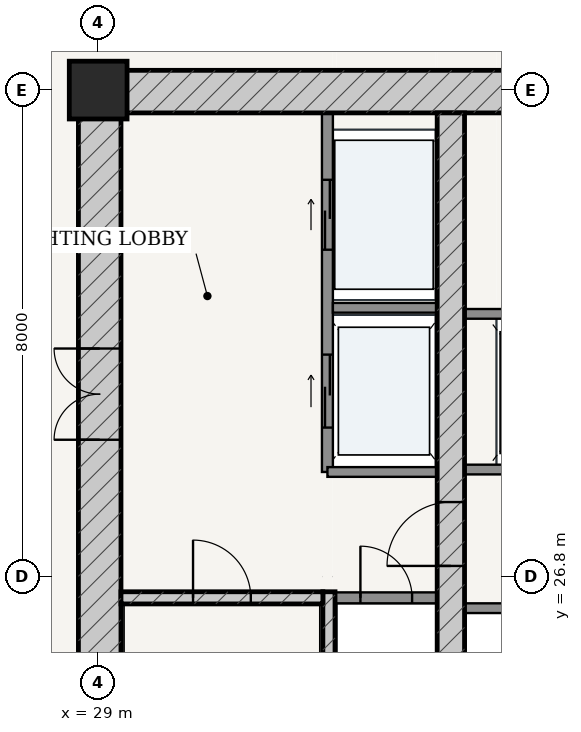
"""IFC4 building model, lengths in metres.
Left out: names, types, materials, properties, quantities, classifications, styles, units other than length and angle.
Written with IfcOpenShell. Run it as: python <this file> out.ifc"""

import sys

from ifc_helpers import new_model, si_unit, direction, frame, frame_2d, origin, origin_2d, place, context, subcontext, project, spatial, rectangle, extrude, source, transform, mapped, element, fill, save


model = new_model("IFC4")
c1 = context("Model", 3, precision=1e-05, world=origin(), true_north=direction((-0.2419218956, 0.970295726276)))
c2 = subcontext(c1, "Body", "Model", "MODEL_VIEW")
j1 = project(units=[si_unit("LENGTHUNIT", "METRE"), si_unit("PLANEANGLEUNIT", "RADIAN")], contexts=[c1])
p1 = place(None, origin())
s1 = spatial("IfcSite", under=j1, at=p1, CompositionType="ELEMENT")
p2 = place(p1, origin())
s2 = spatial("IfcBuilding", under=s1, at=p2, CompositionType="ELEMENT")
p3 = place(p2, frame((0.0, 0.0, 94.2)))
s3 = spatial("IfcBuildingStorey", under=s2, at=p3, CompositionType="ELEMENT", Elevation=94.2)
p4 = place(p3, frame((29.0, 34.8, 0.0), z_axis=(0.0, 0.0, 1.0), x_axis=(1.0, 0.0, 0.0)))
e1 = element("IfcColumn", 1, at=p4, inside=s3, PredefinedType="COLUMN", context=c2, shape_type="SweptSolid", body=[
    extrude(rectangle(XDim=0.95, YDim=0.95, at=origin_2d()), origin(), (0.0, 0.0, 1.0), 3.6),
])
p5 = place(p3, frame((28.675, 34.775, 0.0), z_axis=(0.0, 0.0, 1.0), x_axis=(1.0, 0.0, 0.0)))
e2 = element("IfcWall", 2, at=p5, inside=s3, PredefinedType="SHEAR", context=c2, shape_type="SweptSolid", body=[
    extrude(rectangle(XDim=18.65, YDim=0.7, at=frame_2d((9.325, 0.0))), origin(), (0.0, 0.0, 1.0), 3.325),
])
p6 = place(p5, frame((8.9, 0.0, 0.0)))
e3 = element("IfcOpeningElement", 3, at=p6, cuts=e2, PredefinedType="OPENING", context=c2, shape_type="SweptSolid", body=[
    extrude(rectangle(XDim=0.85, YDim=2.1, at=frame_2d((0.425, 1.05))), frame((0.0, 0.36, 0.0), z_axis=(0.0, -1.0, 0.0), x_axis=(1.0, 0.0, 0.0)), (0.0, 0.0, 1.0), 0.72),
])
p7 = place(p3, frame((29.025, 19.175, 0.0), z_axis=(0.0, 0.0, 1.0), x_axis=(0.0, 1.0, 0.0)))
e4 = element("IfcWall", 4, at=p7, inside=s3, PredefinedType="SHEAR", context=c2, shape_type="SweptSolid", body=[
    extrude(rectangle(XDim=15.25, YDim=0.7, at=frame_2d((7.625, 0.0))), origin(), (0.0, 0.0, 1.0), 3.325),
])
p8 = place(p7, frame((9.875, 0.0, 0.0)))
e5 = element("IfcOpeningElement", 5, at=p8, cuts=e4, PredefinedType="OPENING", context=c2, shape_type="SweptSolid", body=[
    extrude(rectangle(XDim=1.5, YDim=2.2, at=frame_2d((0.75, 1.1))), frame((0.0, 0.36, 0.0), z_axis=(0.0, -1.0, 0.0), x_axis=(1.0, 0.0, 0.0)), (0.0, 0.0, 1.0), 0.72),
])
p9 = place(p3, frame((32.795, 19.175, 0.0), z_axis=(0.0, 0.0, 1.0), x_axis=(0.0, 1.0, 0.0)))
e6 = element("IfcWall", 6, at=p9, inside=s3, PredefinedType="SOLIDWALL", context=c2, shape_type="SweptSolid", body=[
    extrude(rectangle(XDim=7.375, YDim=0.2, at=frame_2d((3.688, 0.0))), origin(), (0.0, 0.0, 1.0), 3.325),
])
p10 = place(p3, frame((29.375, 26.45, 0.0), z_axis=(0.0, 0.0, 1.0), x_axis=(1.0, 0.0, 0.0)))
e7 = element("IfcWall", 7, at=p10, inside=s3, PredefinedType="SOLIDWALL", context=c2, shape_type="SweptSolid", body=[
    extrude(rectangle(XDim=3.32, YDim=0.2, at=frame_2d((1.66, 0.0))), origin(), (0.0, 0.0, 1.0), 3.325),
])
p11 = place(p10, frame((1.185, 0.0, 0.0)))
e8 = element("IfcOpeningElement", 8, at=p11, cuts=e7, PredefinedType="OPENING", context=c2, shape_type="SweptSolid", body=[
    extrude(rectangle(XDim=0.95, YDim=2.15, at=frame_2d((0.475, 1.075))), frame((0.0, 0.11, 0.0), z_axis=(0.0, -1.0, 0.0), x_axis=(1.0, 0.0, 0.0)), (0.0, 0.0, 1.0), 0.22),
])
p12 = place(p3, frame((34.8, 19.175, 0.0), z_axis=(0.0, 0.0, 1.0), x_axis=(0.0, 1.0, 0.0)))
e9 = element("IfcWall", 9, at=p12, inside=s3, PredefinedType="SHEAR", context=c2, shape_type="SweptSolid", body=[
    extrude(rectangle(XDim=15.25, YDim=0.45, at=frame_2d((7.625, 0.0))), origin(), (0.0, 0.0, 1.0), 3.325),
])
p13 = place(p12, frame((7.8, 0.0, 0.0)))
e10 = element("IfcOpeningElement", 10, at=p13, cuts=e9, PredefinedType="OPENING", context=c2, shape_type="SweptSolid", body=[
    extrude(rectangle(XDim=1.05, YDim=2.15, at=frame_2d((0.525, 1.075))), frame((0.0, 0.235, 0.0), z_axis=(0.0, -1.0, 0.0), x_axis=(1.0, 0.0, 0.0)), (0.0, 0.0, 1.0), 0.47),
])
p14 = place(p3, frame((32.9, 26.45, 0.0), z_axis=(0.0, 0.0, 1.0), x_axis=(1.0, 0.0, 0.0)))
e11 = element("IfcWall", 11, at=p14, inside=s3, PredefinedType="PARTITIONING", context=c2, shape_type="SweptSolid", body=[
    extrude(rectangle(XDim=1.675, YDim=0.18, at=frame_2d((0.837, 0.0))), origin(), (0.0, 0.0, 1.0), 3.325),
])
p15 = place(p14, frame((0.413, 0.0, 0.0)))
e12 = element("IfcOpeningElement", 12, at=p15, cuts=e11, PredefinedType="OPENING", context=c2, shape_type="SweptSolid", body=[
    extrude(rectangle(XDim=0.85, YDim=2.1, at=frame_2d((0.425, 1.05))), frame((0.0, 0.1, 0.0), z_axis=(0.0, -1.0, 0.0), x_axis=(1.0, 0.0, 0.0)), (0.0, 0.0, 1.0), 0.2),
])
p16 = place(p3, frame((32.77, 28.52, 0.0), z_axis=(0.0, 0.0, 1.0), x_axis=(0.0, 1.0, 0.0)))
e13 = element("IfcWall", 13, at=p16, inside=s3, PredefinedType="PARTITIONING", context=c2, shape_type="SweptSolid", body=[
    extrude(rectangle(XDim=5.905, YDim=0.18, at=frame_2d((2.953, 0.0))), origin(), (0.0, 0.0, 1.0), 3.325),
])
p17 = place(p16, frame((3.655, 0.0, 0.0)))
e14 = element("IfcOpeningElement", 14, at=p17, cuts=e13, PredefinedType="OPENING", context=c2, shape_type="SweptSolid", body=[
    extrude(rectangle(XDim=1.15, YDim=2.2, at=frame_2d((0.575, 1.1))), frame((0.0, 0.1, 0.0), z_axis=(0.0, -1.0, 0.0), x_axis=(1.0, 0.0, 0.0)), (0.0, 0.0, 1.0), 0.2),
])
p18 = place(p16, frame((0.73, 0.0, 0.0)))
e15 = element("IfcOpeningElement", 15, at=p18, cuts=e13, PredefinedType="OPENING", context=c2, shape_type="SweptSolid", body=[
    extrude(rectangle(XDim=1.2, YDim=2.25, at=frame_2d((0.6, 1.125))), frame((0.0, 0.1, 0.0), z_axis=(0.0, -1.0, 0.0), x_axis=(1.0, 0.0, 0.0)), (0.0, 0.0, 1.0), 0.2),
])
p19 = place(p3, frame((32.86, 31.22, 0.0), z_axis=(0.0, 0.0, 1.0), x_axis=(1.0, 0.0, 0.0)))
e16 = element("IfcWall", 16, at=p19, inside=s3, PredefinedType="PARTITIONING", context=c2, shape_type="SweptSolid", body=[
    extrude(rectangle(XDim=1.715, YDim=0.16, at=frame_2d((0.857, 0.0))), origin(), (0.0, 0.0, 1.0), 3.325),
])
p20 = place(p3, frame((32.77, 28.52, 0.0), z_axis=(0.0, 0.0, 1.0), x_axis=(1.0, 0.0, 0.0)))
e17 = element("IfcWall", 17, at=p20, inside=s3, PredefinedType="PARTITIONING", context=c2, shape_type="SweptSolid", body=[
    extrude(rectangle(XDim=1.805, YDim=0.16, at=frame_2d((0.902, 0.0))), origin(), (0.0, 0.0, 1.0), 3.325),
])
p21 = place(p3, frame((35.025, 28.56, 0.0), z_axis=(0.0, 0.0, 1.0), x_axis=(1.0, 0.0, 0.0)))
e18 = element("IfcWall", 18, at=p21, inside=s3, PredefinedType="PARTITIONING", context=c2, shape_type="SweptSolid", body=[
    extrude(rectangle(XDim=5.95, YDim=0.16, at=frame_2d((2.975, 0.0))), origin(), (0.0, 0.0, 1.0), 3.325),
])
p22 = place(p21, frame((0.76, 0.0, 0.0)))
e19 = element("IfcOpeningElement", 19, at=p22, cuts=e18, PredefinedType="OPENING", context=c2, shape_type="SweptSolid", body=[
    extrude(rectangle(XDim=1.1, YDim=2.2, at=frame_2d((0.55, 1.1))), frame((0.0, 0.09, 0.0), z_axis=(0.0, -1.0, 0.0), x_axis=(1.0, 0.0, 0.0)), (0.0, 0.0, 1.0), 0.18),
])
p23 = place(p21, frame((2.425, 0.0, 0.0)))
e20 = element("IfcOpeningElement", 20, at=p23, cuts=e18, PredefinedType="OPENING", context=c2, shape_type="SweptSolid", body=[
    extrude(rectangle(XDim=1.1, YDim=2.2, at=frame_2d((0.55, 1.1))), frame((0.0, 0.09, 0.0), z_axis=(0.0, -1.0, 0.0), x_axis=(1.0, 0.0, 0.0)), (0.0, 0.0, 1.0), 0.18),
])
p24 = place(p21, frame((4.09, 0.0, 0.0)))
e21 = element("IfcOpeningElement", 21, at=p24, cuts=e18, PredefinedType="OPENING", context=c2, shape_type="SweptSolid", body=[
    extrude(rectangle(XDim=1.1, YDim=2.2, at=frame_2d((0.55, 1.1))), frame((0.0, 0.09, 0.0), z_axis=(0.0, -1.0, 0.0), x_axis=(1.0, 0.0, 0.0)), (0.0, 0.0, 1.0), 0.18),
])
for number, where, z_axis, x_axis in (
    (22, (35.025, 31.12, 0.0), (0.0, 0.0, 1.0), (1.0, 0.0, 0.0)),
    (23, (35.025, 26.28, 0.0), (0.0, 0.0, 1.0), (1.0, 0.0, 0.0)),
):
    element("IfcWall", number, at=place(p3, frame(where, z_axis=z_axis, x_axis=x_axis)), inside=s3, PredefinedType="PARTITIONING", context=c2, shape_type="SweptSolid", body=[
        extrude(rectangle(XDim=5.95, YDim=0.16, at=frame_2d((2.975, 0.0))), origin(), (0.0, 0.0, 1.0), 3.325),
    ])
m1 = source(origin(), c2, "Body", "SweptSolid", [
    extrude(rectangle(XDim=1.5, YDim=2.2, at=frame_2d((0.75, 1.1))), frame((0.0, 0.025, 0.0), z_axis=(0.0, -1.0, 0.0), x_axis=(1.0, 0.0, 0.0)), (0.0, 0.0, 1.0), 0.05),
])
p25 = place(p8, origin())
e24 = element("IfcDoor", 24, at=p25, inside=s3, OperationType="DOUBLE_DOOR_SINGLE_SWING", PredefinedType="DOOR", context=c2, shape_type="MappedRepresentation", body=[
    mapped(m1, transform((0.0, 0.0, 0.0), scale=1.0)),
])
fill(e5, e24)
m2 = source(origin(), c2, "Body", "SweptSolid", [
    extrude(rectangle(XDim=1.05, YDim=2.15, at=frame_2d((0.525, 1.075))), frame((0.0, 0.025, 0.0), z_axis=(0.0, -1.0, 0.0), x_axis=(1.0, 0.0, 0.0)), (0.0, 0.0, 1.0), 0.05),
])
p26 = place(p13, origin())
e25 = element("IfcDoor", 25, at=p26, inside=s3, OperationType="SINGLE_SWING_LEFT", PredefinedType="DOOR", context=c2, shape_type="MappedRepresentation", body=[
    mapped(m2, transform((0.0, 0.0, 0.0), scale=1.0)),
])
fill(e10, e25)
m3 = source(origin(), c2, "Body", "SweptSolid", [
    extrude(rectangle(XDim=0.95, YDim=2.15, at=frame_2d((0.475, 1.075))), frame((0.0, 0.025, 0.0), z_axis=(0.0, -1.0, 0.0), x_axis=(1.0, 0.0, 0.0)), (0.0, 0.0, 1.0), 0.05),
])
p27 = place(p11, origin())
e26 = element("IfcDoor", 26, at=p27, inside=s3, OperationType="SINGLE_SWING_LEFT", PredefinedType="DOOR", context=c2, shape_type="MappedRepresentation", body=[
    mapped(m3, transform((0.0, 0.0, 0.0), scale=1.0)),
])
fill(e8, e26)
m4 = source(origin(), c2, "Body", "SweptSolid", [
    extrude(rectangle(XDim=0.85, YDim=2.1, at=frame_2d((0.425, 1.05))), frame((0.0, 0.025, 0.0), z_axis=(0.0, -1.0, 0.0), x_axis=(1.0, 0.0, 0.0)), (0.0, 0.0, 1.0), 0.05),
])
p28 = place(p15, origin())
e27 = element("IfcDoor", 27, at=p28, inside=s3, OperationType="SINGLE_SWING_LEFT", PredefinedType="DOOR", context=c2, shape_type="MappedRepresentation", body=[
    mapped(m4, transform((0.0, 0.0, 0.0), scale=1.0)),
])
fill(e12, e27)
m5 = source(origin(), c2, "Body", "SweptSolid", [
    extrude(rectangle(XDim=1.15, YDim=2.2, at=frame_2d((0.575, 1.1))), frame((0.0, 0.025, 0.0), z_axis=(0.0, -1.0, 0.0), x_axis=(1.0, 0.0, 0.0)), (0.0, 0.0, 1.0), 0.05),
])
p29 = place(p17, origin())
e28 = element("IfcDoor", 28, at=p29, inside=s3, OperationType="DOUBLE_DOOR_SLIDING", PredefinedType="DOOR", context=c2, shape_type="MappedRepresentation", body=[
    mapped(m5, transform((0.0, 0.0, 0.0), scale=1.0)),
])
fill(e14, e28)
m6 = source(origin(), c2, "Body", "SweptSolid", [
    extrude(rectangle(XDim=1.2, YDim=2.25, at=frame_2d((0.6, 1.125))), frame((0.0, 0.025, 0.0), z_axis=(0.0, -1.0, 0.0), x_axis=(1.0, 0.0, 0.0)), (0.0, 0.0, 1.0), 0.05),
])
p30 = place(p18, origin())
e29 = element("IfcDoor", 29, at=p30, inside=s3, OperationType="DOUBLE_DOOR_SLIDING", PredefinedType="DOOR", context=c2, shape_type="MappedRepresentation", body=[
    mapped(m6, transform((0.0, 0.0, 0.0), scale=1.0)),
])
fill(e15, e29)
save(model, sys.argv[1])
